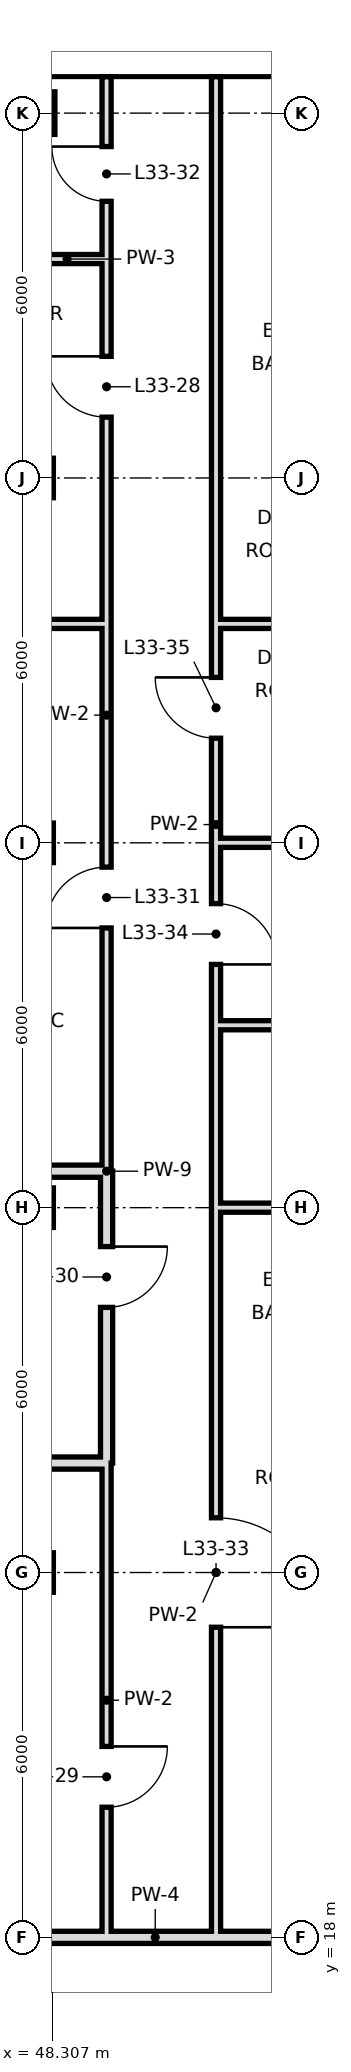
"""IFC4 building model, lengths in metres.
Left out: names, types, materials, properties, quantities, classifications, styles, units other than length and angle.
Written with IfcOpenShell. Run it as: python <this file> out.ifc"""

import sys

from ifc_helpers import new_model, si_unit, direction, frame, frame_2d, origin, origin_2d, place, context, subcontext, project, spatial, rectangle, hollow_rectangle, extrude, element, fill, save


model = new_model("IFC4")
c1 = context("Model", 3, precision=1e-05, world=origin(), true_north=direction((0.0, 1.0)))
c2 = subcontext(c1, "Body", "Model", "MODEL_VIEW")
j1 = project(units=[si_unit("LENGTHUNIT", "METRE"), si_unit("PLANEANGLEUNIT", "RADIAN")], contexts=[c1])
p1 = place(None, origin())
s1 = spatial("IfcSite", under=j1, at=p1, CompositionType="ELEMENT")
p2 = place(p1, origin())
s2 = spatial("IfcBuilding", under=s1, at=p2, CompositionType="ELEMENT")
p3 = place(p2, frame((0.0, 0.0, 147.4)))
s3 = spatial("IfcBuildingStorey", under=s2, at=p3, CompositionType="ELEMENT", Elevation=147.4)
for number, where, z_axis, x_axis in (
    (1, (48.0, 24.0, 0.0), (0.0, 0.0, 1.0), (1.0, 0.0, 0.0)),
    (2, (48.0, 30.0, 0.0), (0.0, 0.0, 1.0), (1.0, 0.0, 0.0)),
    (3, (48.0, 36.0, 0.0), (0.0, 0.0, 1.0), (1.0, 0.0, 0.0)),
    (4, (48.0, 42.0, 0.0), (0.0, 0.0, 1.0), (1.0, 0.0, 0.0)),
):
    element("IfcColumn", number, at=place(p3, frame(where, z_axis=z_axis, x_axis=x_axis)), inside=s3, PredefinedType="COLUMN", context=c2, shape_type="SweptSolid", body=[
        extrude(hollow_rectangle(XDim=0.65, YDim=0.65, WallThickness=0.032, at=origin_2d()), origin(), (0.0, 0.0, 1.0), 3.6),
    ])
p4 = place(p3, frame((48.0, 48.0, 0.0), z_axis=(0.0, 0.0, 1.0), x_axis=(1.0, 0.0, 0.0)))
e5 = element("IfcColumn", 5, at=p4, inside=s3, PredefinedType="COLUMN", context=c2, shape_type="SweptSolid", body=[
    extrude(hollow_rectangle(XDim=0.7, YDim=0.7, WallThickness=0.036, at=origin_2d()), origin(), (0.0, 0.0, 1.0), 3.6),
])
p5 = place(p3, frame((49.2, 25.8, 0.0), z_axis=(0.0, 0.0, 1.0), x_axis=(0.0, 1.0, 0.0)))
e6 = element("IfcWall", 6, at=p5, inside=s3, PredefinedType="SOLIDWALL", context=c2, shape_type="SweptSolid", body=[
    extrude(rectangle(XDim=4.8, YDim=0.2, at=frame_2d((2.4, 0.0))), origin(), (0.0, 0.0, 1.0), 2.72),
])
p6 = place(p5, frame((2.56, 0.0, 0.0)))
e7 = element("IfcOpeningElement", 7, at=p6, cuts=e6, PredefinedType="OPENING", context=c2, shape_type="SweptSolid", body=[
    extrude(rectangle(XDim=1.0, YDim=2.4, at=frame_2d((0.5, 1.2))), frame((0.0, 0.11, 0.0), z_axis=(0.0, -1.0, 0.0), x_axis=(1.0, 0.0, 0.0)), (0.0, 0.0, 1.0), 0.22),
])
p7 = place(p3, frame((49.2, 18.0, 0.0), z_axis=(0.0, 0.0, 1.0), x_axis=(0.0, 1.0, 0.0)))
e8 = element("IfcWall", 8, at=p7, inside=s3, PredefinedType="PARTITIONING", context=c2, shape_type="SweptSolid", body=[
    extrude(rectangle(XDim=7.8, YDim=0.15, at=frame_2d((3.9, 0.0))), origin(), (0.0, 0.0, 1.0), 3.42),
])
p8 = place(p7, frame((2.14, 0.0, 0.0)))
e9 = element("IfcOpeningElement", 9, at=p8, cuts=e8, PredefinedType="OPENING", context=c2, shape_type="SweptSolid", body=[
    extrude(rectangle(XDim=1.0, YDim=2.4, at=frame_2d((0.5, 1.2))), frame((0.0, 0.085, 0.0), z_axis=(0.0, -1.0, 0.0), x_axis=(1.0, 0.0, 0.0)), (0.0, 0.0, 1.0), 0.17),
])
p9 = place(p3, frame((49.2, 30.6, 0.0), z_axis=(0.0, 0.0, 1.0), x_axis=(0.0, 1.0, 0.0)))
e10 = element("IfcWall", 10, at=p9, inside=s3, PredefinedType="PARTITIONING", context=c2, shape_type="SweptSolid", body=[
    extrude(rectangle(XDim=15.0, YDim=0.15, at=frame_2d((7.5, 0.0))), origin(), (0.0, 0.0, 1.0), 3.42),
])
p10 = place(p9, frame((12.4, 0.0, 0.0)))
e11 = element("IfcOpeningElement", 11, at=p10, cuts=e10, PredefinedType="OPENING", context=c2, shape_type="SweptSolid", body=[
    extrude(rectangle(XDim=1.0, YDim=2.4, at=frame_2d((0.5, 1.2))), frame((0.0, 0.085, 0.0), z_axis=(0.0, -1.0, 0.0), x_axis=(1.0, 0.0, 0.0)), (0.0, 0.0, 1.0), 0.17),
])
p11 = place(p9, frame((4.0, 0.0, 0.0)))
e12 = element("IfcOpeningElement", 12, at=p11, cuts=e10, PredefinedType="OPENING", context=c2, shape_type="SweptSolid", body=[
    extrude(rectangle(XDim=1.0, YDim=2.4, at=frame_2d((0.5, 1.2))), frame((0.0, 0.085, 0.0), z_axis=(0.0, -1.0, 0.0), x_axis=(1.0, 0.0, 0.0)), (0.0, 0.0, 1.0), 0.17),
])
p12 = place(p3, frame((49.2, 45.6, 0.0), z_axis=(0.0, 0.0, 1.0), x_axis=(0.0, 1.0, 0.0)))
e13 = element("IfcWall", 13, at=p12, inside=s3, PredefinedType="PARTITIONING", context=c2, shape_type="SweptSolid", body=[
    extrude(rectangle(XDim=3.0, YDim=0.15, at=frame_2d((1.5, 0.0))), origin(), (0.0, 0.0, 1.0), 3.42),
])
p13 = place(p12, frame((0.95, 0.0, 0.0)))
e14 = element("IfcOpeningElement", 14, at=p13, cuts=e13, PredefinedType="OPENING", context=c2, shape_type="SweptSolid", body=[
    extrude(rectangle(XDim=0.9, YDim=2.4, at=frame_2d((0.45, 1.2))), frame((0.0, 0.085, 0.0), z_axis=(0.0, -1.0, 0.0), x_axis=(1.0, 0.0, 0.0)), (0.0, 0.0, 1.0), 0.17),
])
p14 = place(p3, frame((51.0, 18.0, 0.0), z_axis=(0.0, 0.0, 1.0), x_axis=(0.0, 1.0, 0.0)))
e15 = element("IfcWall", 15, at=p14, inside=s3, PredefinedType="PARTITIONING", context=c2, shape_type="SweptSolid", body=[
    extrude(rectangle(XDim=12.0, YDim=0.15, at=frame_2d((6.0, 0.0))), origin(), (0.0, 0.0, 1.0), 3.42),
])
p15 = place(p14, frame((5.1, 0.0, 0.0)))
e16 = element("IfcOpeningElement", 16, at=p15, cuts=e15, PredefinedType="OPENING", context=c2, shape_type="SweptSolid", body=[
    extrude(rectangle(XDim=1.8, YDim=2.4, at=frame_2d((0.9, 1.2))), frame((0.0, 0.085, 0.0), z_axis=(0.0, -1.0, 0.0), x_axis=(1.0, 0.0, 0.0)), (0.0, 0.0, 1.0), 0.17),
])
p16 = place(p3, frame((51.0, 33.0, 0.0), z_axis=(0.0, 0.0, 1.0), x_axis=(0.0, 1.0, 0.0)))
e17 = element("IfcWall", 17, at=p16, inside=s3, PredefinedType="PARTITIONING", context=c2, shape_type="SweptSolid", body=[
    extrude(rectangle(XDim=6.6, YDim=0.15, at=frame_2d((3.3, 0.0))), origin(), (0.0, 0.0, 1.0), 3.42),
])
p17 = place(p16, frame((1.0, 0.0, 0.0)))
e18 = element("IfcOpeningElement", 18, at=p17, cuts=e17, PredefinedType="OPENING", context=c2, shape_type="SweptSolid", body=[
    extrude(rectangle(XDim=1.0, YDim=2.4, at=frame_2d((0.5, 1.2))), frame((0.0, 0.085, 0.0), z_axis=(0.0, -1.0, 0.0), x_axis=(1.0, 0.0, 0.0)), (0.0, 0.0, 1.0), 0.17),
])
p18 = place(p16, frame((4.72, 0.0, 0.0)))
e19 = element("IfcOpeningElement", 19, at=p18, cuts=e17, PredefinedType="OPENING", context=c2, shape_type="SweptSolid", body=[
    extrude(rectangle(XDim=1.0, YDim=2.4, at=frame_2d((0.5, 1.2))), frame((0.0, 0.085, 0.0), z_axis=(0.0, -1.0, 0.0), x_axis=(1.0, 0.0, 0.0)), (0.0, 0.0, 1.0), 0.17),
])
p19 = place(p3, frame((51.0, 30.0, 0.0), z_axis=(0.0, 0.0, 1.0), x_axis=(0.0, 1.0, 0.0)))
e20 = element("IfcWall", 20, at=p19, inside=s3, PredefinedType="PARTITIONING", context=c2, shape_type="SweptSolid", body=[
    extrude(rectangle(XDim=3.0, YDim=0.15, at=frame_2d((1.5, 0.0))), origin(), (0.0, 0.0, 1.0), 3.42),
])
p20 = place(p3, frame((51.0, 39.6, 0.0), z_axis=(0.0, 0.0, 1.0), x_axis=(0.0, 1.0, 0.0)))
e21 = element("IfcWall", 21, at=p20, inside=s3, PredefinedType="PARTITIONING", context=c2, shape_type="SweptSolid", body=[
    extrude(rectangle(XDim=9.0, YDim=0.15, at=frame_2d((4.5, 0.0))), origin(), (0.0, 0.0, 1.0), 3.42),
])
p21 = place(p3, frame((44.9, 18.0, 0.0), z_axis=(0.0, 0.0, 1.0), x_axis=(1.0, 0.0, 0.0)))
e22 = element("IfcWall", 22, at=p21, inside=s3, PredefinedType="SOLIDWALL", context=c2, shape_type="SweptSolid", body=[
    extrude(rectangle(XDim=10.9, YDim=0.2, at=frame_2d((5.45, 0.0))), origin(), (0.0, 0.0, 1.0), 2.72),
])
p22 = place(p3, frame((44.9, 25.8, 0.0), z_axis=(0.0, 0.0, 1.0), x_axis=(1.0, 0.0, 0.0)))
e23 = element("IfcWall", 23, at=p22, inside=s3, PredefinedType="SOLIDWALL", context=c2, shape_type="SweptSolid", body=[
    extrude(rectangle(XDim=4.3, YDim=0.2, at=frame_2d((2.15, 0.0))), origin(), (0.0, 0.0, 1.0), 2.97),
])
p23 = place(p3, frame((51.0, 30.0, 0.0), z_axis=(0.0, 0.0, 1.0), x_axis=(1.0, 0.0, 0.0)))
e24 = element("IfcWall", 24, at=p23, inside=s3, PredefinedType="PARTITIONING", context=c2, shape_type="SweptSolid", body=[
    extrude(rectangle(XDim=3.0, YDim=0.15, at=frame_2d((1.5, 0.0))), origin(), (0.0, 0.0, 1.0), 2.72),
])
p24 = place(p3, frame((44.9, 30.6, 0.0), z_axis=(0.0, 0.0, 1.0), x_axis=(1.0, 0.0, 0.0)))
e25 = element("IfcWall", 25, at=p24, inside=s3, PredefinedType="SOLIDWALL", context=c2, shape_type="SweptSolid", body=[
    extrude(rectangle(XDim=4.3, YDim=0.2, at=frame_2d((2.15, 0.0))), origin(), (0.0, 0.0, 1.0), 2.97),
])
p25 = place(p3, frame((51.0, 33.0, 0.0), z_axis=(0.0, 0.0, 1.0), x_axis=(1.0, 0.0, 0.0)))
e26 = element("IfcWall", 26, at=p25, inside=s3, PredefinedType="PARTITIONING", context=c2, shape_type="SweptSolid", body=[
    extrude(rectangle(XDim=3.0, YDim=0.15, at=frame_2d((1.5, 0.0))), origin(), (0.0, 0.0, 1.0), 3.42),
])
p26 = place(p3, frame((51.0, 36.0, 0.0), z_axis=(0.0, 0.0, 1.0), x_axis=(1.0, 0.0, 0.0)))
e27 = element("IfcWall", 27, at=p26, inside=s3, PredefinedType="PARTITIONING", context=c2, shape_type="SweptSolid", body=[
    extrude(rectangle(XDim=9.0, YDim=0.15, at=frame_2d((4.5, 0.0))), origin(), (0.0, 0.0, 1.0), 2.72),
])
p27 = place(p3, frame((44.9, 39.6, 0.0), z_axis=(0.0, 0.0, 1.0), x_axis=(1.0, 0.0, 0.0)))
e28 = element("IfcWall", 28, at=p27, inside=s3, PredefinedType="PARTITIONING", context=c2, shape_type="SweptSolid", body=[
    extrude(rectangle(XDim=4.3, YDim=0.15, at=frame_2d((2.15, 0.0))), origin(), (0.0, 0.0, 1.0), 3.42),
])
p28 = place(p3, frame((51.0, 39.6, 0.0), z_axis=(0.0, 0.0, 1.0), x_axis=(1.0, 0.0, 0.0)))
e29 = element("IfcWall", 29, at=p28, inside=s3, PredefinedType="PARTITIONING", context=c2, shape_type="SweptSolid", body=[
    extrude(rectangle(XDim=3.0, YDim=0.15, at=frame_2d((1.5, 0.0))), origin(), (0.0, 0.0, 1.0), 3.42),
])
p29 = place(p3, frame((44.9, 45.6, 0.0), z_axis=(0.0, 0.0, 1.0), x_axis=(1.0, 0.0, 0.0)))
e30 = element("IfcWall", 30, at=p29, inside=s3, PredefinedType="PARTITIONING", context=c2, shape_type="SweptSolid", body=[
    extrude(rectangle(XDim=4.3, YDim=0.15, at=frame_2d((2.15, 0.0))), origin(), (0.0, 0.0, 1.0), 3.42),
])
p30 = place(p10, frame((1.0, 0.0, 0.0), z_axis=(0.0, 0.0, 1.0), x_axis=(-1.0, 0.0, 0.0)))
e31 = element("IfcDoor", 31, at=p30, inside=s3, OperationType="SINGLE_SWING_LEFT", PredefinedType="DOOR", context=c2, shape_type="SweptSolid", body=[
    extrude(rectangle(XDim=1.0, YDim=2.4, at=frame_2d((0.5, 1.2))), frame((0.0, 0.025, 0.0), z_axis=(0.0, -1.0, 0.0), x_axis=(1.0, 0.0, 0.0)), (0.0, 0.0, 1.0), 0.05),
])
fill(e11, e31)
p31 = place(p8, origin())
e32 = element("IfcDoor", 32, at=p31, inside=s3, OperationType="SINGLE_SWING_RIGHT", PredefinedType="DOOR", context=c2, shape_type="SweptSolid", body=[
    extrude(rectangle(XDim=1.0, YDim=2.4, at=frame_2d((0.5, 1.2))), frame((0.0, 0.025, 0.0), z_axis=(0.0, -1.0, 0.0), x_axis=(1.0, 0.0, 0.0)), (0.0, 0.0, 1.0), 0.05),
])
fill(e9, e32)
p32 = place(p6, origin())
e33 = element("IfcDoor", 33, at=p32, inside=s3, OperationType="SINGLE_SWING_RIGHT", PredefinedType="DOOR", context=c2, shape_type="SweptSolid", body=[
    extrude(rectangle(XDim=1.0, YDim=2.4, at=frame_2d((0.5, 1.2))), frame((0.0, 0.025, 0.0), z_axis=(0.0, -1.0, 0.0), x_axis=(1.0, 0.0, 0.0)), (0.0, 0.0, 1.0), 0.05),
])
fill(e7, e33)
p33 = place(p11, origin())
e34 = element("IfcDoor", 34, at=p33, inside=s3, OperationType="SINGLE_SWING_LEFT", PredefinedType="DOOR", context=c2, shape_type="SweptSolid", body=[
    extrude(rectangle(XDim=1.0, YDim=2.4, at=frame_2d((0.5, 1.2))), frame((0.0, 0.025, 0.0), z_axis=(0.0, -1.0, 0.0), x_axis=(1.0, 0.0, 0.0)), (0.0, 0.0, 1.0), 0.05),
])
fill(e12, e34)
p34 = place(p13, frame((0.9, 0.0, 0.0), z_axis=(0.0, 0.0, 1.0), x_axis=(-1.0, 0.0, 0.0)))
e35 = element("IfcDoor", 35, at=p34, inside=s3, OperationType="SINGLE_SWING_LEFT", PredefinedType="DOOR", context=c2, shape_type="SweptSolid", body=[
    extrude(rectangle(XDim=0.9, YDim=2.4, at=frame_2d((0.45, 1.2))), frame((0.0, 0.025, 0.0), z_axis=(0.0, -1.0, 0.0), x_axis=(1.0, 0.0, 0.0)), (0.0, 0.0, 1.0), 0.05),
])
fill(e14, e35)
p35 = place(p15, frame((1.8, 0.0, 0.0), z_axis=(0.0, 0.0, 1.0), x_axis=(-1.0, 0.0, 0.0)))
e36 = element("IfcDoor", 36, at=p35, inside=s3, OperationType="SINGLE_SWING_RIGHT", PredefinedType="DOOR", context=c2, shape_type="SweptSolid", body=[
    extrude(rectangle(XDim=1.8, YDim=2.4, at=frame_2d((0.9, 1.2))), frame((0.0, 0.025, 0.0), z_axis=(0.0, -1.0, 0.0), x_axis=(1.0, 0.0, 0.0)), (0.0, 0.0, 1.0), 0.05),
])
fill(e16, e36)
p36 = place(p17, frame((1.0, 0.0, 0.0), z_axis=(0.0, 0.0, 1.0), x_axis=(-1.0, 0.0, 0.0)))
e37 = element("IfcDoor", 37, at=p36, inside=s3, OperationType="SINGLE_SWING_RIGHT", PredefinedType="DOOR", context=c2, shape_type="SweptSolid", body=[
    extrude(rectangle(XDim=1.0, YDim=2.4, at=frame_2d((0.5, 1.2))), frame((0.0, 0.025, 0.0), z_axis=(0.0, -1.0, 0.0), x_axis=(1.0, 0.0, 0.0)), (0.0, 0.0, 1.0), 0.05),
])
fill(e18, e37)
p37 = place(p18, frame((1.0, 0.0, 0.0), z_axis=(0.0, 0.0, 1.0), x_axis=(-1.0, 0.0, 0.0)))
e38 = element("IfcDoor", 38, at=p37, inside=s3, OperationType="SINGLE_SWING_LEFT", PredefinedType="DOOR", context=c2, shape_type="SweptSolid", body=[
    extrude(rectangle(XDim=1.0, YDim=2.4, at=frame_2d((0.5, 1.2))), frame((0.0, 0.025, 0.0), z_axis=(0.0, -1.0, 0.0), x_axis=(1.0, 0.0, 0.0)), (0.0, 0.0, 1.0), 0.05),
])
fill(e19, e38)
save(model, sys.argv[1])
